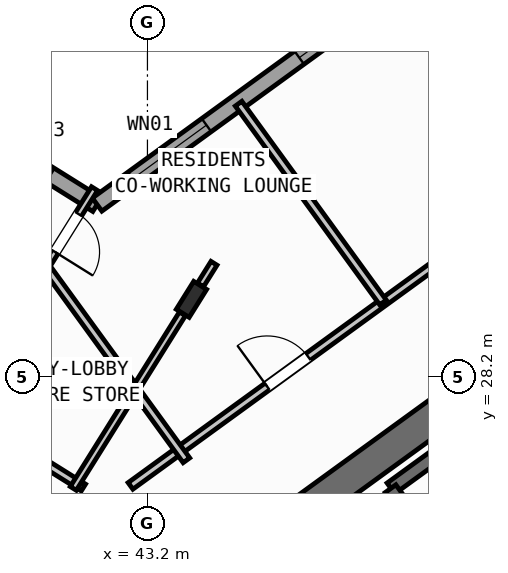
"""IFC4 building model, lengths in metres.
Left out: names, types, materials, properties, quantities, classifications, styles, units other than length and angle.
Written with IfcOpenShell. Run it as: python <this file> out.ifc"""

import sys

from ifc_helpers import new_model, si_unit, direction, frame, frame_2d, origin, origin_2d, place, context, subcontext, project, spatial, rectangle, i_section, extrude, source, transform, mapped, element, fill, save


model = new_model("IFC4")
c1 = context("Model", 3, precision=1e-05, world=origin(), true_north=direction((0.0, 1.0)))
c2 = subcontext(c1, "Body", "Model", "MODEL_VIEW")
j1 = project(units=[si_unit("LENGTHUNIT", "METRE"), si_unit("PLANEANGLEUNIT", "RADIAN")], contexts=[c1])
p1 = place(None, origin())
s1 = spatial("IfcSite", under=j1, at=p1, CompositionType="ELEMENT")
p2 = place(p1, origin())
s2 = spatial("IfcBuilding", under=s1, at=p2, CompositionType="ELEMENT")
p3 = place(p2, frame((0.0, 0.0, 71.7)))
s3 = spatial("IfcBuildingStorey", under=s2, at=p3, CompositionType="ELEMENT", Elevation=71.7)
p4 = place(p3, frame((44.325, 24.113, 0.0), z_axis=(0.0, 0.0, 1.0), x_axis=(0.809012664862, 0.58779121131, 0.0)))
e1 = element("IfcWall", 1, at=p4, inside=s3, PredefinedType="SHEAR", context=c2, shape_type="SweptSolid", body=[
    extrude(rectangle(XDim=12.44, YDim=0.65, at=frame_2d((6.22, 0.0))), origin(), (0.0, 0.0, 1.0), 4.52),
])
m1 = source(origin(), c2, "Body", "SweptSolid", [
    extrude(i_section(OverallWidth=0.3, OverallDepth=0.65, WebThickness=0.016, FlangeThickness=0.031, at=origin_2d()), origin(), (0.0, 0.0, 1.0), 4.8),
])
p5 = place(p3, frame((44.068, 29.726, 0.0), z_axis=(0.0, 0.0, 1.0), x_axis=(-0.848048096156, 0.529919264233, 0.0)))
e2 = element("IfcColumn", 2, at=p5, inside=s3, PredefinedType="COLUMN", context=c2, shape_type="MappedRepresentation", body=[
    mapped(m1, transform((0.0, 0.0, 0.0), scale=1.0)),
])
p6 = place(p3, frame((17.424, 47.083, 0.0), z_axis=(0.0, 0.0, 1.0), x_axis=(0.848049927979, -0.529916332693, 0.0)))
e3 = element("IfcWall", 3, at=p6, inside=s3, PredefinedType="STANDARD", context=c2, shape_type="SweptSolid", body=[
    extrude(rectangle(XDim=29.223, YDim=0.32, at=frame_2d((14.612, 0.0))), origin(), (0.0, 0.0, 1.0), 4.52),
])
p7 = place(p6, frame((3.339, 0.0, 0.0)))
e4 = element("IfcOpeningElement", 4, at=p7, cuts=e3, PredefinedType="OPENING", context=c2, shape_type="SweptSolid", body=[
    extrude(rectangle(XDim=1.05, YDim=2.15, at=frame_2d((0.525, 1.075))), frame((0.0, 0.17, 0.0), z_axis=(0.0, -1.0, 0.0), x_axis=(1.0, 0.0, 0.0)), (0.0, 0.0, 1.0), 0.34),
])
p8 = place(p6, frame((8.194, 0.0, 0.75)))
e5 = element("IfcOpeningElement", 5, at=p8, cuts=e3, PredefinedType="OPENING", context=c2, shape_type="SweptSolid", body=[
    extrude(rectangle(XDim=2.4, YDim=1.6, at=frame_2d((1.2, 0.8))), frame((0.0, 0.17, 0.0), z_axis=(0.0, -1.0, 0.0), x_axis=(1.0, 0.0, 0.0)), (0.0, 0.0, 1.0), 0.34),
])
p9 = place(p6, frame((22.226, 0.0, 0.85)))
e6 = element("IfcOpeningElement", 6, at=p9, cuts=e3, PredefinedType="OPENING", context=c2, shape_type="SweptSolid", body=[
    extrude(rectangle(XDim=1.8, YDim=1.5, at=frame_2d((0.9, 0.75))), frame((0.0, 0.17, 0.0), z_axis=(0.0, -1.0, 0.0), x_axis=(1.0, 0.0, 0.0)), (0.0, 0.0, 1.0), 0.34),
])
p10 = place(p6, frame((26.934, 0.0, 0.95)))
e7 = element("IfcOpeningElement", 7, at=p10, cuts=e3, PredefinedType="OPENING", context=c2, shape_type="SweptSolid", body=[
    extrude(rectangle(XDim=1.2, YDim=1.4, at=frame_2d((0.6, 0.7))), frame((0.0, 0.17, 0.0), z_axis=(0.0, -1.0, 0.0), x_axis=(1.0, 0.0, 0.0)), (0.0, 0.0, 1.0), 0.34),
])
p11 = place(p6, frame((14.636, 0.0, 1.0)))
e8 = element("IfcOpeningElement", 8, at=p11, cuts=e3, PredefinedType="OPENING", context=c2, shape_type="SweptSolid", body=[
    extrude(rectangle(XDim=0.9, YDim=1.25, at=frame_2d((0.45, 0.625))), frame((0.0, 0.17, 0.0), z_axis=(0.0, -1.0, 0.0), x_axis=(1.0, 0.0, 0.0)), (0.0, 0.0, 1.0), 0.34),
])
p12 = place(p3, frame((42.207, 31.597, 0.0), z_axis=(0.0, 0.0, 1.0), x_axis=(0.809020333377, 0.587780656523, 0.0)))
e9 = element("IfcWall", 9, at=p12, inside=s3, PredefinedType="STANDARD", context=c2, shape_type="SweptSolid", body=[
    extrude(rectangle(XDim=15.223, YDim=0.32, at=frame_2d((7.611, 0.0))), origin(), (0.0, 0.0, 1.0), 4.52),
])
p13 = place(p12, frame((12.562, 0.0, 0.0)))
e10 = element("IfcOpeningElement", 10, at=p13, cuts=e9, PredefinedType="OPENING", context=c2, shape_type="SweptSolid", body=[
    extrude(rectangle(XDim=1.05, YDim=2.15, at=frame_2d((0.525, 1.075))), frame((0.0, 0.17, 0.0), z_axis=(0.0, -1.0, 0.0), x_axis=(1.0, 0.0, 0.0)), (0.0, 0.0, 1.0), 0.34),
])
p14 = place(p12, frame((0.868, 0.0, 0.85)))
e11 = element("IfcOpeningElement", 11, at=p14, cuts=e9, PredefinedType="OPENING", context=c2, shape_type="SweptSolid", body=[
    extrude(rectangle(XDim=1.8, YDim=1.5, at=frame_2d((0.9, 0.75))), frame((0.0, 0.17, 0.0), z_axis=(0.0, -1.0, 0.0), x_axis=(1.0, 0.0, 0.0)), (0.0, 0.0, 1.0), 0.34),
])
p15 = place(p12, frame((4.932, 0.0, 0.85)))
e12 = element("IfcOpeningElement", 12, at=p15, cuts=e9, PredefinedType="OPENING", context=c2, shape_type="SweptSolid", body=[
    extrude(rectangle(XDim=1.8, YDim=1.5, at=frame_2d((0.9, 0.75))), frame((0.0, 0.17, 0.0), z_axis=(0.0, -1.0, 0.0), x_axis=(1.0, 0.0, 0.0)), (0.0, 0.0, 1.0), 0.34),
])
p16 = place(p3, frame((48.006, 25.996, 0.0), z_axis=(0.0, 0.0, 1.0), x_axis=(0.80901903764, 0.587782439969, 0.0)))
e13 = element("IfcWall", 13, at=p16, inside=s3, PredefinedType="SHEAR", context=c2, shape_type="SweptSolid", body=[
    extrude(rectangle(XDim=7.46, YDim=0.26, at=frame_2d((3.73, 0.0))), origin(), (0.0, 0.0, 1.0), 4.52),
])
p17 = place(p3, frame((49.855, 23.434, 0.0), z_axis=(0.0, 0.0, 1.0), x_axis=(-0.58776738483, 0.809029975545, 0.0)))
e14 = element("IfcWall", 14, at=p17, inside=s3, PredefinedType="SHEAR", context=c2, shape_type="SweptSolid", body=[
    extrude(rectangle(XDim=3.16, YDim=0.26, at=frame_2d((1.58, 0.0))), origin(), (0.0, 0.0, 1.0), 4.52),
])
p18 = place(p3, frame((41.936, 26.012, 0.0), z_axis=(0.0, 0.0, 1.0), x_axis=(-0.848051154596, 0.529914369676, 0.0)))
e15 = element("IfcWall", 15, at=p18, inside=s3, PredefinedType="PARTITIONING", context=c2, shape_type="SweptSolid", body=[
    extrude(rectangle(XDim=15.57, YDim=0.16, at=frame_2d((7.785, 0.0))), origin(), (0.0, 0.0, 1.0), 4.51),
])
p19 = place(p18, frame((4.1, 0.0, 0.0)))
e16 = element("IfcOpeningElement", 16, at=p19, cuts=e15, PredefinedType="OPENING", context=c2, shape_type="SweptSolid", body=[
    extrude(rectangle(XDim=0.96, YDim=2.08, at=frame_2d((0.48, 1.04))), frame((0.0, 0.09, 0.0), z_axis=(0.0, -1.0, 0.0), x_axis=(1.0, 0.0, 0.0)), (0.0, 0.0, 1.0), 0.18),
])
p20 = place(p18, frame((8.2, 0.0, 0.0)))
e17 = element("IfcOpeningElement", 17, at=p20, cuts=e15, PredefinedType="OPENING", context=c2, shape_type="SweptSolid", body=[
    extrude(rectangle(XDim=1.7, YDim=2.2, at=frame_2d((0.85, 1.1))), frame((0.0, 0.09, 0.0), z_axis=(0.0, -1.0, 0.0), x_axis=(1.0, 0.0, 0.0)), (0.0, 0.0, 1.0), 0.18),
])
p21 = place(p3, frame((42.156, 31.912, 0.0), z_axis=(0.0, 0.0, 1.0), x_axis=(-0.529943141103, -0.848033175765, 0.0)))
e18 = element("IfcWall", 18, at=p21, inside=s3, PredefinedType="PLUMBINGWALL", context=c2, shape_type="SweptSolid", body=[
    extrude(rectangle(XDim=2.753, YDim=0.14, at=frame_2d((1.376, 0.0))), origin(), (0.0, 0.0, 1.0), 4.005),
])
p22 = place(p21, frame((0.593, 0.0, 0.0)))
e19 = element("IfcOpeningElement", 19, at=p22, cuts=e18, PredefinedType="OPENING", context=c2, shape_type="SweptSolid", body=[
    extrude(rectangle(XDim=0.88, YDim=2.08, at=frame_2d((0.44, 1.04))), frame((0.0, 0.08, 0.0), z_axis=(0.0, -1.0, 0.0), x_axis=(1.0, 0.0, 0.0)), (0.0, 0.0, 1.0), 0.16),
])
p23 = place(p3, frame((44.514, 30.439, 0.0), z_axis=(0.0, 0.0, 1.0), x_axis=(-0.529824479439, -0.848107316905, 0.0)))
e20 = element("IfcWall", 20, at=p23, inside=s3, PredefinedType="PLUMBINGWALL", context=c2, shape_type="SweptSolid", body=[
    extrude(rectangle(XDim=0.503, YDim=0.14, at=frame_2d((0.251, 0.0))), origin(), (0.0, 0.0, 1.0), 4.51),
])
p24 = place(p3, frame((43.89, 29.44, 0.0), z_axis=(0.0, 0.0, 1.0), x_axis=(-0.529928721319, -0.84804218664, 0.0)))
e21 = element("IfcWall", 21, at=p24, inside=s3, PredefinedType="PLUMBINGWALL", context=c2, shape_type="SweptSolid", body=[
    extrude(rectangle(XDim=4.063, YDim=0.14, at=frame_2d((2.031, 0.0))), origin(), (0.0, 0.0, 1.0), 3.895),
])
p25 = place(p3, frame((42.866, 26.044, 0.0), z_axis=(0.0, 0.0, 1.0), x_axis=(0.809020254154, 0.587780765566, 0.0)))
e22 = element("IfcWall", 22, at=p25, inside=s3, PredefinedType="PARTITIONING", context=c2, shape_type="SweptSolid", body=[
    extrude(rectangle(XDim=14.67, YDim=0.16, at=frame_2d((7.335, 0.0))), origin(), (0.0, 0.0, 1.0), 4.51),
])
p26 = place(p25, frame((3.335, 0.0, 0.0)))
e23 = element("IfcOpeningElement", 23, at=p26, cuts=e22, PredefinedType="OPENING", context=c2, shape_type="SweptSolid", body=[
    extrude(rectangle(XDim=1.0, YDim=2.1, at=frame_2d((0.5, 1.05))), frame((0.0, 0.09, 0.0), z_axis=(0.0, -1.0, 0.0), x_axis=(1.0, 0.0, 0.0)), (0.0, 0.0, 1.0), 0.18),
])
p27 = place(p25, frame((9.915, 0.0, 0.0)))
e24 = element("IfcOpeningElement", 24, at=p27, cuts=e22, PredefinedType="OPENING", context=c2, shape_type="SweptSolid", body=[
    extrude(rectangle(XDim=1.0, YDim=2.1, at=frame_2d((0.5, 1.05))), frame((0.0, 0.09, 0.0), z_axis=(0.0, -1.0, 0.0), x_axis=(1.0, 0.0, 0.0)), (0.0, 0.0, 1.0), 0.18),
])
p28 = place(p3, frame((43.969, 26.55, 0.0), z_axis=(0.0, 0.0, 1.0), x_axis=(-0.587776919386, 0.80902304852, 0.0)))
e25 = element("IfcWall", 25, at=p28, inside=s3, PredefinedType="PARTITIONING", context=c2, shape_type="SweptSolid", body=[
    extrude(rectangle(XDim=5.48, YDim=0.16, at=frame_2d((2.74, 0.0))), origin(), (0.0, 0.0, 1.0), 4.51),
])
p29 = place(p3, frame((47.849, 29.665, 0.0), z_axis=(0.0, 0.0, 1.0), x_axis=(-0.587785532001, 0.809016791155, 0.0)))
e26 = element("IfcWall", 26, at=p29, inside=s3, PredefinedType="PARTITIONING", context=c2, shape_type="SweptSolid", body=[
    extrude(rectangle(XDim=4.85, YDim=0.16, at=frame_2d((2.425, 0.0))), origin(), (0.0, 0.0, 1.0), 4.51),
])
m2 = source(origin(), c2, "Body", "SweptSolid", [
    extrude(rectangle(XDim=1.8, YDim=1.5, at=frame_2d((0.9, 0.75))), frame((0.0, 0.03, 0.0), z_axis=(0.0, -1.0, 0.0), x_axis=(1.0, 0.0, 0.0)), (0.0, 0.0, 1.0), 0.06),
])
p30 = place(p14, origin())
e27 = element("IfcWindow", 27, at=p30, inside=s3, PartitioningType="SINGLE_PANEL", PredefinedType="WINDOW", context=c2, shape_type="MappedRepresentation", body=[
    mapped(m2, transform((0.0, 0.0, 0.0), scale=1.0)),
])
fill(e11, e27)
p31 = place(p15, origin())
e28 = element("IfcWindow", 28, at=p31, inside=s3, PartitioningType="SINGLE_PANEL", PredefinedType="WINDOW", context=c2, shape_type="MappedRepresentation", body=[
    mapped(m2, transform((0.0, 0.0, 0.0), scale=1.0)),
])
fill(e12, e28)
m3 = source(origin(), c2, "Body", "SweptSolid", [
    extrude(rectangle(XDim=0.88, YDim=2.08, at=frame_2d((0.44, 1.04))), frame((0.0, 0.025, 0.0), z_axis=(0.0, -1.0, 0.0), x_axis=(1.0, 0.0, 0.0)), (0.0, 0.0, 1.0), 0.05),
])
p32 = place(p22, origin())
e29 = element("IfcDoor", 29, at=p32, inside=s3, OperationType="SINGLE_SWING_RIGHT", PredefinedType="DOOR", context=c2, shape_type="MappedRepresentation", body=[
    mapped(m3, transform((0.0, 0.0, 0.0), scale=1.0)),
])
fill(e19, e29)
m4 = source(origin(), c2, "Body", "SweptSolid", [
    extrude(rectangle(XDim=1.0, YDim=2.1, at=frame_2d((0.5, 1.05))), frame((0.0, 0.025, 0.0), z_axis=(0.0, -1.0, 0.0), x_axis=(1.0, 0.0, 0.0)), (0.0, 0.0, 1.0), 0.05),
])
p33 = place(p26, origin())
e30 = element("IfcDoor", 30, at=p33, inside=s3, OperationType="SINGLE_SWING_LEFT", PredefinedType="DOOR", context=c2, shape_type="MappedRepresentation", body=[
    mapped(m4, transform((0.0, 0.0, 0.0), scale=1.0)),
])
fill(e23, e30)
save(model, sys.argv[1])
